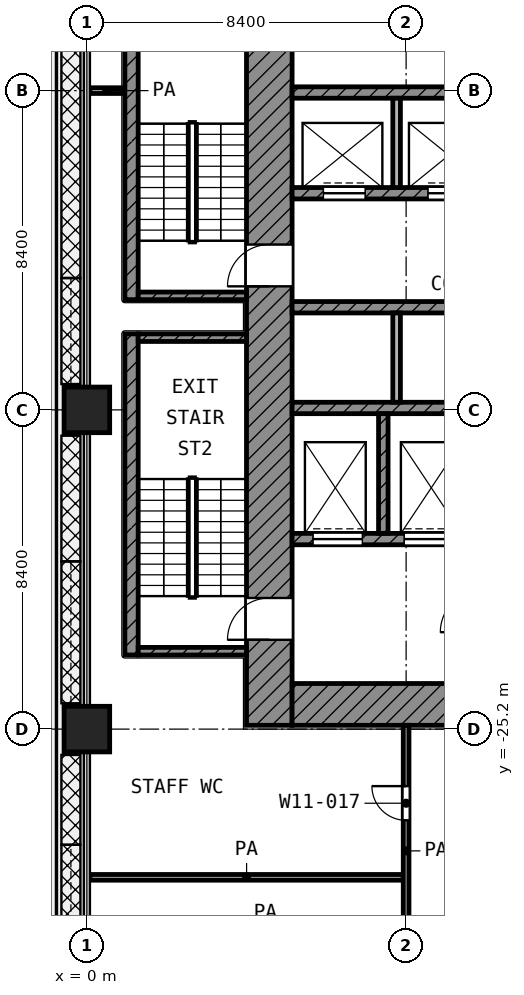
"""IFC4 building model, lengths in metres.
Left out: names, types, materials, properties, quantities, classifications, styles, units other than length and angle.
Written with IfcOpenShell. Run it as: python <this file> out.ifc"""

import sys

from ifc_helpers import new_model, si_unit, direction, frame, frame_2d, origin, origin_2d, place, context, subcontext, project, spatial, rectangle, extrude, element, fill, save


model = new_model("IFC4")
c1 = context("Model", 3, precision=1e-05, world=origin(), true_north=direction((0.0, 1.0)))
c2 = subcontext(c1, "Body", "Model", "MODEL_VIEW")
j1 = project(units=[si_unit("LENGTHUNIT", "METRE"), si_unit("PLANEANGLEUNIT", "RADIAN")], contexts=[c1])
p1 = place(None, origin())
s1 = spatial("IfcSite", under=j1, at=p1, CompositionType="ELEMENT")
p2 = place(p1, origin())
s2 = spatial("IfcBuilding", under=s1, at=p2, CompositionType="ELEMENT")
p3 = place(p2, frame((0.0, 0.0, 72.8)))
s3 = spatial("IfcBuildingStorey", under=s2, at=p3, CompositionType="ELEMENT", Elevation=72.8)
for number, where, z_axis, x_axis in (
    (1, (0.0, -16.8, 0.0), (0.0, 0.0, 1.0), (1.0, 0.0, 0.0)),
    (2, (0.0, -25.2, 0.0), (0.0, 0.0, 1.0), (1.0, 0.0, 0.0)),
):
    element("IfcColumn", number, at=place(p3, frame(where, z_axis=z_axis, x_axis=x_axis)), inside=s3, PredefinedType="COLUMN", context=c2, shape_type="SweptSolid", body=[
        extrude(rectangle(XDim=1.2, YDim=1.2, at=origin_2d()), origin(), (0.0, 0.0, 1.0), 4.2),
    ])
p4 = place(p3, frame((4.8, -25.1, 0.0), z_axis=(0.0, 0.0, 1.0), x_axis=(0.0, 1.0, 0.0)))
e3 = element("IfcWall", 3, at=p4, inside=s3, PredefinedType="SHEAR", context=c2, shape_type="SweptSolid", body=[
    extrude(rectangle(XDim=19.7, YDim=1.2, at=frame_2d((9.85, 0.0))), origin(), (0.0, 0.0, 1.0), 3.9),
])
p5 = place(p4, frame((11.55, 0.0, 0.0)))
e4 = element("IfcOpeningElement", 4, at=p5, cuts=e3, PredefinedType="OPENING", context=c2, shape_type="SweptSolid", body=[
    extrude(rectangle(XDim=1.1, YDim=2.1, at=frame_2d((0.55, 1.05))), frame((0.0, 0.61, 0.0), z_axis=(0.0, -1.0, 0.0), x_axis=(1.0, 0.0, 0.0)), (0.0, 0.0, 1.0), 1.22),
])
p6 = place(p4, frame((2.25, 0.0, 0.0)))
e5 = element("IfcOpeningElement", 5, at=p6, cuts=e3, PredefinedType="OPENING", context=c2, shape_type="SweptSolid", body=[
    extrude(rectangle(XDim=1.1, YDim=2.1, at=frame_2d((0.55, 1.05))), frame((0.0, 0.61, 0.0), z_axis=(0.0, -1.0, 0.0), x_axis=(1.0, 0.0, 0.0)), (0.0, 0.0, 1.0), 1.22),
])
p7 = place(p3, frame((5.4, -24.55, 0.0), z_axis=(0.0, 0.0, 1.0), x_axis=(1.0, 0.0, 0.0)))
e6 = element("IfcWall", 6, at=p7, inside=s3, PredefinedType="SHEAR", context=c2, shape_type="SweptSolid", body=[
    extrude(rectangle(XDim=18.6, YDim=1.1, at=frame_2d((9.3, 0.0))), origin(), (0.0, 0.0, 1.0), 3.9),
])
p8 = place(p7, frame((6.3, 0.0, 0.0)))
e7 = element("IfcOpeningElement", 7, at=p8, cuts=e6, PredefinedType="OPENING", context=c2, shape_type="SweptSolid", body=[
    extrude(rectangle(XDim=1.8, YDim=2.1, at=frame_2d((0.9, 1.05))), frame((0.0, 0.56, 0.0), z_axis=(0.0, -1.0, 0.0), x_axis=(1.0, 0.0, 0.0)), (0.0, 0.0, 1.0), 1.12),
])
p9 = place(p3, frame((5.4, -8.45, 0.0), z_axis=(0.0, 0.0, 1.0), x_axis=(1.0, 0.0, 0.0)))
e8 = element("IfcWall", 8, at=p9, inside=s3, PredefinedType="SHEAR", context=c2, shape_type="SweptSolid", body=[
    extrude(rectangle(XDim=16.65, YDim=0.3, at=frame_2d((8.325, 0.0))), origin(), (0.0, 0.0, 1.0), 3.9),
])
p10 = place(p3, frame((5.4, -11.1, 0.0), z_axis=(0.0, 0.0, 1.0), x_axis=(1.0, 0.0, 0.0)))
e9 = element("IfcWall", 9, at=p10, inside=s3, PredefinedType="SHEAR", context=c2, shape_type="SweptSolid", body=[
    extrude(rectangle(XDim=16.65, YDim=0.3, at=frame_2d((8.325, 0.0))), origin(), (0.0, 0.0, 1.0), 3.9),
])
p11 = place(p10, frame((0.825, 0.0, 0.0)))
e10 = element("IfcOpeningElement", 10, at=p11, cuts=e9, PredefinedType="OPENING", context=c2, shape_type="SweptSolid", body=[
    extrude(rectangle(XDim=1.1, YDim=2.1, at=frame_2d((0.55, 1.05))), frame((0.0, 0.16, 0.0), z_axis=(0.0, -1.0, 0.0), x_axis=(1.0, 0.0, 0.0)), (0.0, 0.0, 1.0), 0.32),
])
p12 = place(p10, frame((3.575, 0.0, 0.0)))
e11 = element("IfcOpeningElement", 11, at=p12, cuts=e9, PredefinedType="OPENING", context=c2, shape_type="SweptSolid", body=[
    extrude(rectangle(XDim=1.1, YDim=2.1, at=frame_2d((0.55, 1.05))), frame((0.0, 0.16, 0.0), z_axis=(0.0, -1.0, 0.0), x_axis=(1.0, 0.0, 0.0)), (0.0, 0.0, 1.0), 0.32),
])
p13 = place(p10, frame((6.325, 0.0, 0.0)))
e12 = element("IfcOpeningElement", 12, at=p13, cuts=e9, PredefinedType="OPENING", context=c2, shape_type="SweptSolid", body=[
    extrude(rectangle(XDim=1.1, YDim=2.1, at=frame_2d((0.55, 1.05))), frame((0.0, 0.16, 0.0), z_axis=(0.0, -1.0, 0.0), x_axis=(1.0, 0.0, 0.0)), (0.0, 0.0, 1.0), 0.32),
])
p14 = place(p10, frame((9.075, 0.0, 0.0)))
e13 = element("IfcOpeningElement", 13, at=p14, cuts=e9, PredefinedType="OPENING", context=c2, shape_type="SweptSolid", body=[
    extrude(rectangle(XDim=1.1, YDim=2.1, at=frame_2d((0.55, 1.05))), frame((0.0, 0.16, 0.0), z_axis=(0.0, -1.0, 0.0), x_axis=(1.0, 0.0, 0.0)), (0.0, 0.0, 1.0), 0.32),
])
for number, where, z_axis, x_axis in (
    (14, (5.4, -14.1, 0.0), (0.0, 0.0, 1.0), (1.0, 0.0, 0.0)),
    (15, (5.4, -16.75, 0.0), (0.0, 0.0, 1.0), (1.0, 0.0, 0.0)),
):
    element("IfcWall", number, at=place(p3, frame(where, z_axis=z_axis, x_axis=x_axis)), inside=s3, PredefinedType="SHEAR", context=c2, shape_type="SweptSolid", body=[
        extrude(rectangle(XDim=16.65, YDim=0.3, at=frame_2d((8.325, 0.0))), origin(), (0.0, 0.0, 1.0), 3.9),
    ])
p15 = place(p3, frame((5.4, -20.2, 0.0), z_axis=(0.0, 0.0, 1.0), x_axis=(1.0, 0.0, 0.0)))
e16 = element("IfcWall", 16, at=p15, inside=s3, PredefinedType="SHEAR", context=c2, shape_type="SweptSolid", body=[
    extrude(rectangle(XDim=14.65, YDim=0.3, at=frame_2d((7.325, 0.0))), origin(), (0.0, 0.0, 1.0), 3.9),
])
p16 = place(p15, frame((10.55, 0.0, 0.0)))
e17 = element("IfcOpeningElement", 17, at=p16, cuts=e16, PredefinedType="OPENING", context=c2, shape_type="SweptSolid", body=[
    extrude(rectangle(XDim=1.3, YDim=2.1, at=frame_2d((0.65, 1.05))), frame((0.0, 0.16, 0.0), z_axis=(0.0, -1.0, 0.0), x_axis=(1.0, 0.0, 0.0)), (0.0, 0.0, 1.0), 0.32),
])
p17 = place(p15, frame((12.95, 0.0, 0.0)))
e18 = element("IfcOpeningElement", 18, at=p17, cuts=e16, PredefinedType="OPENING", context=c2, shape_type="SweptSolid", body=[
    extrude(rectangle(XDim=1.3, YDim=2.1, at=frame_2d((0.65, 1.05))), frame((0.0, 0.16, 0.0), z_axis=(0.0, -1.0, 0.0), x_axis=(1.0, 0.0, 0.0)), (0.0, 0.0, 1.0), 0.32),
])
p18 = place(p15, frame((0.55, 0.0, 0.0)))
e19 = element("IfcOpeningElement", 19, at=p18, cuts=e16, PredefinedType="OPENING", context=c2, shape_type="SweptSolid", body=[
    extrude(rectangle(XDim=1.3, YDim=2.1, at=frame_2d((0.65, 1.05))), frame((0.0, 0.16, 0.0), z_axis=(0.0, -1.0, 0.0), x_axis=(1.0, 0.0, 0.0)), (0.0, 0.0, 1.0), 0.32),
])
p19 = place(p15, frame((2.95, 0.0, 0.0)))
e20 = element("IfcOpeningElement", 20, at=p19, cuts=e16, PredefinedType="OPENING", context=c2, shape_type="SweptSolid", body=[
    extrude(rectangle(XDim=1.3, YDim=2.1, at=frame_2d((0.65, 1.05))), frame((0.0, 0.16, 0.0), z_axis=(0.0, -1.0, 0.0), x_axis=(1.0, 0.0, 0.0)), (0.0, 0.0, 1.0), 0.32),
])
p20 = place(p15, frame((6.55, 0.0, 0.0)))
e21 = element("IfcOpeningElement", 21, at=p20, cuts=e16, PredefinedType="OPENING", context=c2, shape_type="SweptSolid", body=[
    extrude(rectangle(XDim=0.9, YDim=2.1, at=frame_2d((0.45, 1.05))), frame((0.0, 0.16, 0.0), z_axis=(0.0, -1.0, 0.0), x_axis=(1.0, 0.0, 0.0)), (0.0, 0.0, 1.0), 0.32),
])
p21 = place(p15, frame((8.95, 0.0, 0.0)))
e22 = element("IfcOpeningElement", 22, at=p21, cuts=e16, PredefinedType="OPENING", context=c2, shape_type="SweptSolid", body=[
    extrude(rectangle(XDim=0.9, YDim=2.1, at=frame_2d((0.45, 1.05))), frame((0.0, 0.16, 0.0), z_axis=(0.0, -1.0, 0.0), x_axis=(1.0, 0.0, 0.0)), (0.0, 0.0, 1.0), 0.32),
])
p22 = place(p3, frame((7.8, -20.05, 0.0), z_axis=(0.0, 0.0, 1.0), x_axis=(0.0, 1.0, 0.0)))
e23 = element("IfcWall", 23, at=p22, inside=s3, PredefinedType="SHEAR", context=c2, shape_type="SweptSolid", body=[
    extrude(rectangle(XDim=3.15, YDim=0.25, at=frame_2d((1.575, 0.0))), origin(), (0.0, 0.0, 1.0), 3.9),
])
p23 = place(p3, frame((8.15, -10.95, 0.0), z_axis=(0.0, 0.0, 1.0), x_axis=(0.0, 1.0, 0.0)))
e24 = element("IfcWall", 24, at=p23, inside=s3, PredefinedType="PARTITIONING", context=c2, shape_type="SweptSolid", body=[
    extrude(rectangle(XDim=2.35, YDim=0.2, at=frame_2d((1.175, 0.0))), origin(), (0.0, 0.0, 1.0), 3.9),
])
p24 = place(p3, frame((8.15, -16.6, 0.0), z_axis=(0.0, 0.0, 1.0), x_axis=(0.0, 1.0, 0.0)))
e25 = element("IfcWall", 25, at=p24, inside=s3, PredefinedType="PARTITIONING", context=c2, shape_type="SweptSolid", body=[
    extrude(rectangle(XDim=2.35, YDim=0.2, at=frame_2d((1.175, 0.0))), origin(), (0.0, 0.0, 1.0), 3.9),
])
p25 = place(p3, frame((1.175, -13.9, 0.0), z_axis=(0.0, 0.0, 1.0), x_axis=(0.0, 1.0, 0.0)))
e26 = element("IfcWall", 26, at=p25, inside=s3, PredefinedType="SHEAR", context=c2, shape_type="SweptSolid", body=[
    extrude(rectangle(XDim=8.45, YDim=0.35, at=frame_2d((4.225, 0.0))), origin(), (0.0, 0.0, 1.0), 3.9),
])
p26 = place(p3, frame((1.35, -13.8, 0.0), z_axis=(0.0, 0.0, 1.0), x_axis=(1.0, 0.0, 0.0)))
e27 = element("IfcWall", 27, at=p26, inside=s3, PredefinedType="SHEAR", context=c2, shape_type="SweptSolid", body=[
    extrude(rectangle(XDim=2.85, YDim=0.2, at=frame_2d((1.425, 0.0))), origin(), (0.0, 0.0, 1.0), 3.9),
])
p27 = place(p3, frame((1.175, -23.25, 0.0), z_axis=(0.0, 0.0, 1.0), x_axis=(0.0, 1.0, 0.0)))
e28 = element("IfcWall", 28, at=p27, inside=s3, PredefinedType="SHEAR", context=c2, shape_type="SweptSolid", body=[
    extrude(rectangle(XDim=8.45, YDim=0.35, at=frame_2d((4.225, 0.0))), origin(), (0.0, 0.0, 1.0), 3.9),
])
for number, where, z_axis, x_axis in (
    (29, (1.35, -14.9, 0.0), (0.0, 0.0, 1.0), (1.0, 0.0, 0.0)),
    (30, (1.35, -23.15, 0.0), (0.0, 0.0, 1.0), (1.0, 0.0, 0.0)),
):
    element("IfcWall", number, at=place(p3, frame(where, z_axis=z_axis, x_axis=x_axis)), inside=s3, PredefinedType="SHEAR", context=c2, shape_type="SweptSolid", body=[
        extrude(rectangle(XDim=2.85, YDim=0.2, at=frame_2d((1.425, 0.0))), origin(), (0.0, 0.0, 1.0), 3.9),
    ])
p28 = place(p3, frame((0.08, -29.1, 0.0), z_axis=(0.0, 0.0, 1.0), x_axis=(1.0, 0.0, 0.0)))
e31 = element("IfcWall", 31, at=p28, inside=s3, PredefinedType="PARTITIONING", context=c2, shape_type="SweptSolid", body=[
    extrude(rectangle(XDim=8.245, YDim=0.15, at=frame_2d((4.123, 0.0))), origin(), (0.0, 0.0, 1.0), 3.9),
])
p29 = place(p3, frame((0.08, -8.4, 0.0), z_axis=(0.0, 0.0, 1.0), x_axis=(1.0, 0.0, 0.0)))
e32 = element("IfcWall", 32, at=p29, inside=s3, PredefinedType="PARTITIONING", context=c2, shape_type="SweptSolid", body=[
    extrude(rectangle(XDim=0.89, YDim=0.15, at=frame_2d((0.445, 0.0))), origin(), (0.0, 0.0, 1.0), 3.9),
])
p30 = place(p3, frame((8.4, -31.707, 0.0), z_axis=(0.0, 0.0, 1.0), x_axis=(0.0, 1.0, 0.0)))
e33 = element("IfcWall", 33, at=p30, inside=s3, PredefinedType="PARTITIONING", context=c2, shape_type="SweptSolid", body=[
    extrude(rectangle(XDim=6.607, YDim=0.15, at=frame_2d((3.303, 0.0))), origin(), (0.0, 0.0, 1.0), 3.9),
])
p31 = place(p30, frame((4.107, 0.0, 0.0)))
e34 = element("IfcOpeningElement", 34, at=p31, cuts=e33, PredefinedType="OPENING", context=c2, shape_type="SweptSolid", body=[
    extrude(rectangle(XDim=0.9, YDim=2.1, at=frame_2d((0.45, 1.05))), frame((0.0, 0.085, 0.0), z_axis=(0.0, -1.0, 0.0), x_axis=(1.0, 0.0, 0.0)), (0.0, 0.0, 1.0), 0.17),
])
p32 = place(p11, origin())
e35 = element("IfcDoor", 35, at=p32, inside=s3, OperationType="DOUBLE_DOOR_SLIDING", PredefinedType="DOOR", context=c2, shape_type="SweptSolid", body=[
    extrude(rectangle(XDim=1.1, YDim=2.1, at=frame_2d((0.55, 1.05))), frame((0.0, 0.025, 0.0), z_axis=(0.0, -1.0, 0.0), x_axis=(1.0, 0.0, 0.0)), (0.0, 0.0, 1.0), 0.05),
])
fill(e10, e35)
p33 = place(p12, origin())
e36 = element("IfcDoor", 36, at=p33, inside=s3, OperationType="DOUBLE_DOOR_SLIDING", PredefinedType="DOOR", context=c2, shape_type="SweptSolid", body=[
    extrude(rectangle(XDim=1.1, YDim=2.1, at=frame_2d((0.55, 1.05))), frame((0.0, 0.025, 0.0), z_axis=(0.0, -1.0, 0.0), x_axis=(1.0, 0.0, 0.0)), (0.0, 0.0, 1.0), 0.05),
])
fill(e11, e36)
p34 = place(p18, origin())
e37 = element("IfcDoor", 37, at=p34, inside=s3, OperationType="DOUBLE_DOOR_SLIDING", PredefinedType="DOOR", context=c2, shape_type="SweptSolid", body=[
    extrude(rectangle(XDim=1.3, YDim=2.1, at=frame_2d((0.65, 1.05))), frame((0.0, 0.025, 0.0), z_axis=(0.0, -1.0, 0.0), x_axis=(1.0, 0.0, 0.0)), (0.0, 0.0, 1.0), 0.05),
])
fill(e19, e37)
p35 = place(p19, origin())
e38 = element("IfcDoor", 38, at=p35, inside=s3, OperationType="DOUBLE_DOOR_SLIDING", PredefinedType="DOOR", context=c2, shape_type="SweptSolid", body=[
    extrude(rectangle(XDim=1.3, YDim=2.1, at=frame_2d((0.65, 1.05))), frame((0.0, 0.025, 0.0), z_axis=(0.0, -1.0, 0.0), x_axis=(1.0, 0.0, 0.0)), (0.0, 0.0, 1.0), 0.05),
])
fill(e20, e38)
p36 = place(p5, origin())
e39 = element("IfcDoor", 39, at=p36, inside=s3, OperationType="SINGLE_SWING_LEFT", PredefinedType="DOOR", context=c2, shape_type="SweptSolid", body=[
    extrude(rectangle(XDim=1.1, YDim=2.1, at=frame_2d((0.55, 1.05))), frame((0.0, 0.025, 0.0), z_axis=(0.0, -1.0, 0.0), x_axis=(1.0, 0.0, 0.0)), (0.0, 0.0, 1.0), 0.05),
])
fill(e4, e39)
p37 = place(p6, origin())
e40 = element("IfcDoor", 40, at=p37, inside=s3, OperationType="SINGLE_SWING_LEFT", PredefinedType="DOOR", context=c2, shape_type="SweptSolid", body=[
    extrude(rectangle(XDim=1.1, YDim=2.1, at=frame_2d((0.55, 1.05))), frame((0.0, 0.025, 0.0), z_axis=(0.0, -1.0, 0.0), x_axis=(1.0, 0.0, 0.0)), (0.0, 0.0, 1.0), 0.05),
])
fill(e5, e40)
p38 = place(p31, origin())
e41 = element("IfcDoor", 41, at=p38, inside=s3, OperationType="SINGLE_SWING_RIGHT", PredefinedType="DOOR", context=c2, shape_type="SweptSolid", body=[
    extrude(rectangle(XDim=0.9, YDim=2.1, at=frame_2d((0.45, 1.05))), frame((0.0, 0.025, 0.0), z_axis=(0.0, -1.0, 0.0), x_axis=(1.0, 0.0, 0.0)), (0.0, 0.0, 1.0), 0.05),
])
fill(e34, e41)
save(model, sys.argv[1])
